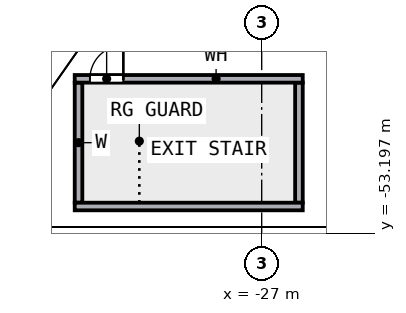
"""IFC4 building model, lengths in metres.
Left out: names, types, materials, properties, quantities, classifications, styles, units other than length and angle.
Written with IfcOpenShell. Run it as: python <this file> out.ifc"""

import sys

from ifc_helpers import new_model, si_unit, direction, frame, frame_2d, origin, place, context, subcontext, project, spatial, rectangle, extrude, element, fill, save


model = new_model("IFC4")
c1 = context("Model", 3, precision=1e-05, world=origin(), true_north=direction((0.0, 1.0)))
c2 = subcontext(c1, "Body", "Model", "MODEL_VIEW")
j1 = project(units=[si_unit("LENGTHUNIT", "METRE"), si_unit("PLANEANGLEUNIT", "RADIAN")], contexts=[c1])
p1 = place(None, origin())
s1 = spatial("IfcSite", under=j1, at=p1, CompositionType="ELEMENT")
p2 = place(p1, origin())
s2 = spatial("IfcBuilding", under=s1, at=p2, CompositionType="ELEMENT")
p3 = place(p2, origin())
s3 = spatial("IfcBuildingStorey", under=s2, at=p3, CompositionType="ELEMENT", Elevation=0.0)
p4 = place(p3, frame((-33.15, -48.125, 0.0), z_axis=(0.0, 0.0, 1.0), x_axis=(1.0, 0.0, 0.0)))
e1 = element("IfcWall", 1, at=p4, inside=s3, PredefinedType="SOLIDWALL", context=c2, shape_type="SweptSolid", body=[
    extrude(rectangle(XDim=7.5, YDim=0.25, at=frame_2d((3.75, 0.0))), origin(), (0.0, 0.0, 1.0), 3.4),
])
p5 = place(p4, frame((0.5, 0.0, 0.0)))
e2 = element("IfcOpeningElement", 2, at=p5, cuts=e1, PredefinedType="OPENING", context=c2, shape_type="SweptSolid", body=[
    extrude(rectangle(XDim=1.1, YDim=2.1, at=frame_2d((0.55, 1.05))), frame((0.0, 0.135, 0.0), z_axis=(0.0, -1.0, 0.0), x_axis=(1.0, 0.0, 0.0)), (0.0, 0.0, 1.0), 0.27),
])
p6 = place(p3, frame((-33.15, -52.325, 0.0), z_axis=(0.0, 0.0, 1.0), x_axis=(1.0, 0.0, 0.0)))
e3 = element("IfcWall", 3, at=p6, inside=s3, PredefinedType="SOLIDWALL", context=c2, shape_type="SweptSolid", body=[
    extrude(rectangle(XDim=7.5, YDim=0.25, at=frame_2d((3.75, 0.0))), origin(), (0.0, 0.0, 1.0), 3.4),
])
for number, where, z_axis, x_axis in (
    (4, (-33.025, -52.2, 0.0), (0.0, 0.0, 1.0), (0.0, 1.0, 0.0)),
    (5, (-25.775, -52.2, 0.0), (0.0, 0.0, 1.0), (0.0, 1.0, 0.0)),
):
    element("IfcWall", number, at=place(p3, frame(where, z_axis=z_axis, x_axis=x_axis)), inside=s3, PredefinedType="SOLIDWALL", context=c2, shape_type="SweptSolid", body=[
        extrude(rectangle(XDim=3.95, YDim=0.25, at=frame_2d((1.975, 0.0))), origin(), (0.0, 0.0, 1.0), 3.4),
    ])
p7 = place(p5, origin())
e6 = element("IfcDoor", 6, at=p7, inside=s3, OperationType="SINGLE_SWING_RIGHT", PredefinedType="DOOR", context=c2, shape_type="SweptSolid", body=[
    extrude(rectangle(XDim=1.1, YDim=2.1, at=frame_2d((0.55, 1.05))), frame((0.0, 0.025, 0.0), z_axis=(0.0, -1.0, 0.0), x_axis=(1.0, 0.0, 0.0)), (0.0, 0.0, 1.0), 0.05),
])
fill(e2, e6)
save(model, sys.argv[1])
